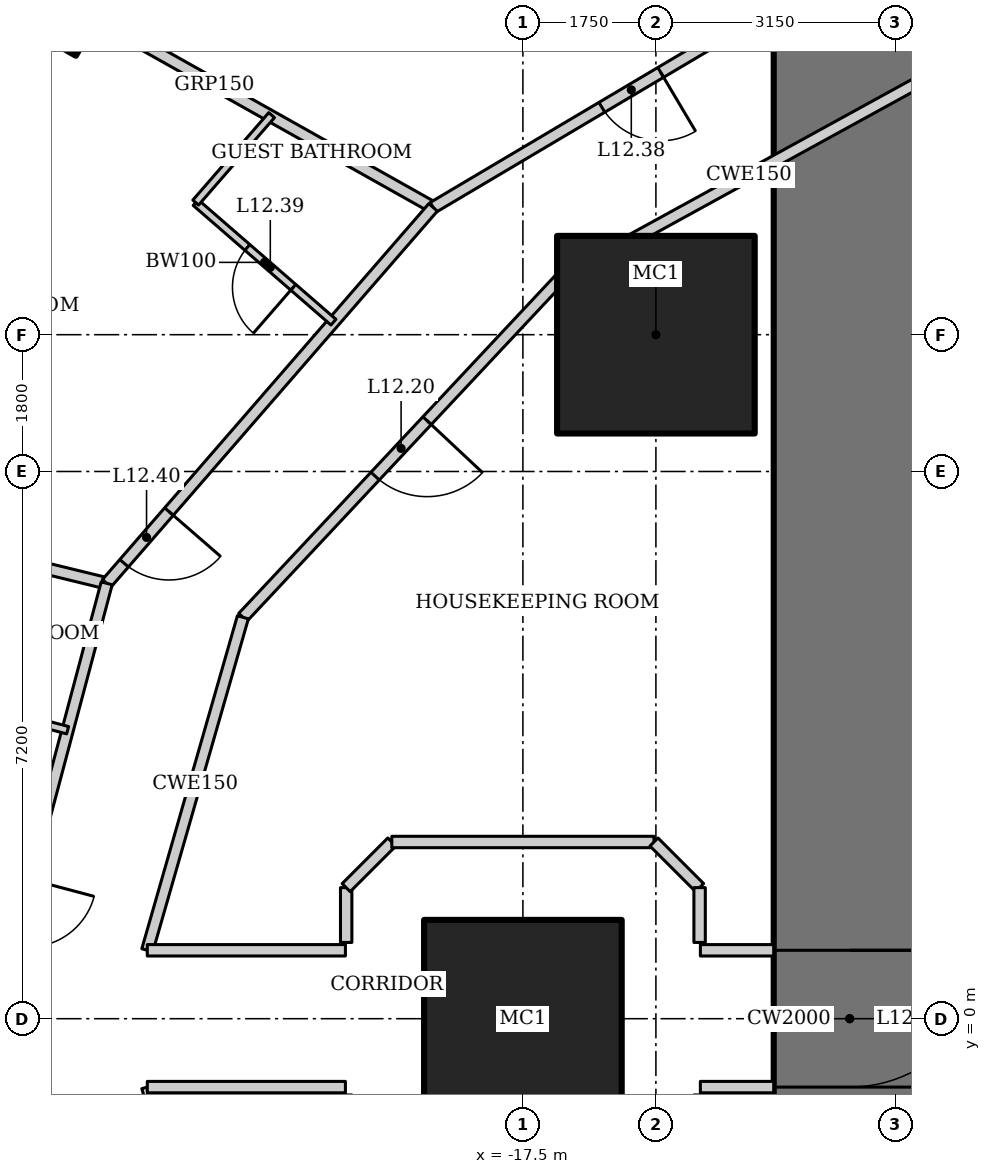
"""IFC4 building model, lengths in metres.
Left out: names, types, materials, properties, quantities, classifications, styles, units other than length and angle.
Written with IfcOpenShell. Run it as: python <this file> out.ifc"""

import sys

from ifc_helpers import new_model, si_unit, direction, frame, frame_2d, origin, origin_2d, place, context, subcontext, project, spatial, rectangle, hollow_rectangle, extrude, element, fill, save


model = new_model("IFC4")
c1 = context("Model", 3, precision=1e-05, world=origin(), true_north=direction((0.0, 1.0)))
c2 = subcontext(c1, "Body", "Model", "MODEL_VIEW")
j1 = project(units=[si_unit("LENGTHUNIT", "METRE"), si_unit("PLANEANGLEUNIT", "RADIAN")], contexts=[c1])
p1 = place(None, origin())
s1 = spatial("IfcSite", under=j1, at=p1, CompositionType="ELEMENT")
p2 = place(p1, origin())
s2 = spatial("IfcBuilding", under=s1, at=p2, CompositionType="ELEMENT")
p3 = place(p2, frame((0.0, 0.0, 58.6)))
s3 = spatial("IfcBuildingStorey", under=s2, at=p3, CompositionType="ELEMENT", Elevation=58.6)
for number, where, z_axis, x_axis in (
    (1, (-15.75, 9.0, 0.0), (0.0, 0.0, 1.0), (1.0, 0.0, 0.0)),
    (2, (-17.5, 0.0, 0.0), (0.0, 0.0, 1.0), (1.0, 0.0, 0.0)),
):
    element("IfcColumn", number, at=place(p3, frame(where, z_axis=z_axis, x_axis=x_axis)), inside=s3, PredefinedType="COLUMN", context=c2, shape_type="SweptSolid", body=[
        extrude(hollow_rectangle(XDim=2.6, YDim=2.6, WallThickness=0.13, at=origin_2d()), origin(), (0.0, 0.0, 1.0), 3.6),
    ])
p4 = place(p3, frame((-23.605, 13.489, 0.0), z_axis=(0.0, 0.0, 1.0), x_axis=(0.496139221777, 0.86824298017, 0.0)))
e3 = element("IfcColumn", 3, at=p4, inside=s3, PredefinedType="COLUMN", context=c2, shape_type="SweptSolid", body=[
    extrude(hollow_rectangle(XDim=1.2, YDim=1.2, WallThickness=0.12, at=origin_2d()), origin(), (0.0, 0.0, 1.0), 3.6),
])
p5 = place(p3, frame((-13.2, 13.0, 0.0), z_axis=(0.0, 0.0, 1.0), x_axis=(0.0, -1.0, 0.0)))
e4 = element("IfcWall", 4, at=p5, inside=s3, PredefinedType="SHEAR", context=c2, shape_type="SweptSolid", body=[
    extrude(rectangle(XDim=26.0, YDim=2.0, at=frame_2d((13.0, 0.0))), origin(), (0.0, 0.0, 1.0), 3.6),
])
p6 = place(p5, frame((12.1, 0.0, 0.0)))
e5 = element("IfcOpeningElement", 5, at=p6, cuts=e4, PredefinedType="OPENING", context=c2, shape_type="SweptSolid", body=[
    extrude(rectangle(XDim=1.8, YDim=2.1, at=frame_2d((0.9, 1.05))), frame((0.0, 1.01, 0.0), z_axis=(0.0, -1.0, 0.0), x_axis=(1.0, 0.0, 0.0)), (0.0, 0.0, 1.0), 2.02),
])
p7 = place(p3, frame((-24.435, 13.909, 0.0), z_axis=(0.0, 0.0, 1.0), x_axis=(0.871747379892, -0.489955616001, 0.0)))
e6 = element("IfcWall", 6, at=p7, inside=s3, PredefinedType="PARTITIONING", context=c2, shape_type="SweptSolid", body=[
    extrude(rectangle(XDim=6.6, YDim=0.15, at=frame_2d((3.3, 0.0))), origin(), (0.0, 0.0, 1.0), 2.693),
])
p8 = place(p3, frame((-29.222, 7.254, 0.0), z_axis=(0.0, 0.0, 1.0), x_axis=(0.971456980633, -0.237215797913, 0.0)))
e7 = element("IfcWall", 7, at=p8, inside=s3, PredefinedType="PARTITIONING", context=c2, shape_type="SweptSolid", body=[
    extrude(rectangle(XDim=6.429, YDim=0.15, at=frame_2d((3.215, 0.0))), origin(), (0.0, 0.0, 1.0), 2.332),
])
p9 = place(p3, frame((-13.357, 13.832, 0.0), z_axis=(0.0, 0.0, 1.0), x_axis=(-0.860147339762, -0.510045639036, 0.0)))
e8 = element("IfcWall", 8, at=p9, inside=s3, PredefinedType="PARTITIONING", context=c2, shape_type="SweptSolid", body=[
    extrude(rectangle(XDim=6.19, YDim=0.15, at=frame_2d((3.095, 0.0))), origin(), (0.0, 0.0, 1.0), 3.45),
])
p10 = place(p9, frame((2.708, 0.0, 0.0)))
e9 = element("IfcOpeningElement", 9, at=p10, cuts=e8, PredefinedType="OPENING", context=c2, shape_type="SweptSolid", body=[
    extrude(rectangle(XDim=0.9, YDim=2.1, at=frame_2d((0.45, 1.05))), frame((0.0, 0.085, 0.0), z_axis=(0.0, -1.0, 0.0), x_axis=(1.0, 0.0, 0.0)), (0.0, 0.0, 1.0), 0.17),
])
p11 = place(p3, frame((-18.681, 10.675, 0.0), z_axis=(0.0, 0.0, 1.0), x_axis=(-0.655599989166, -0.755108372491, 0.0)))
e10 = element("IfcWall", 10, at=p11, inside=s3, PredefinedType="PARTITIONING", context=c2, shape_type="SweptSolid", body=[
    extrude(rectangle(XDim=6.551, YDim=0.15, at=frame_2d((3.275, 0.0))), origin(), (0.0, 0.0, 1.0), 3.45),
])
p12 = place(p11, frame((5.301, 0.0, 0.0)))
e11 = element("IfcOpeningElement", 11, at=p12, cuts=e10, PredefinedType="OPENING", context=c2, shape_type="SweptSolid", body=[
    extrude(rectangle(XDim=0.9, YDim=2.1, at=frame_2d((0.45, 1.05))), frame((0.0, 0.085, 0.0), z_axis=(0.0, -1.0, 0.0), x_axis=(1.0, 0.0, 0.0)), (0.0, 0.0, 1.0), 0.17),
])
p13 = place(p3, frame((-22.976, 5.729, 0.0), z_axis=(0.0, 0.0, 1.0), x_axis=(-0.257083265334, -0.966389256296, 0.0)))
e12 = element("IfcWall", 12, at=p13, inside=s3, PredefinedType="PARTITIONING", context=c2, shape_type="SweptSolid", body=[
    extrude(rectangle(XDim=5.928, YDim=0.15, at=frame_2d((2.964, 0.0))), origin(), (0.0, 0.0, 1.0), 3.45),
])
p14 = place(p13, frame((4.023, 0.0, 0.0)))
e13 = element("IfcOpeningElement", 13, at=p14, cuts=e12, PredefinedType="OPENING", context=c2, shape_type="SweptSolid", body=[
    extrude(rectangle(XDim=0.9, YDim=2.1, at=frame_2d((0.45, 1.05))), frame((0.0, 0.085, 0.0), z_axis=(0.0, -1.0, 0.0), x_axis=(1.0, 0.0, 0.0)), (0.0, 0.0, 1.0), 0.17),
])
p15 = place(p3, frame((-24.5, 0.0, 0.0), z_axis=(0.0, 0.0, 1.0), x_axis=(0.257083265334, -0.966389256296, 0.0)))
e14 = element("IfcWall", 14, at=p15, inside=s3, PredefinedType="PARTITIONING", context=c2, shape_type="SweptSolid", body=[
    extrude(rectangle(XDim=5.928, YDim=0.15, at=frame_2d((2.964, 0.0))), origin(), (0.0, 0.0, 1.0), 3.45),
])
p16 = place(p15, frame((2.1, 0.0, 0.0)))
e15 = element("IfcOpeningElement", 15, at=p16, cuts=e14, PredefinedType="OPENING", context=c2, shape_type="SweptSolid", body=[
    extrude(rectangle(XDim=0.9, YDim=2.1, at=frame_2d((0.45, 1.05))), frame((0.0, 0.085, 0.0), z_axis=(0.0, -1.0, 0.0), x_axis=(1.0, 0.0, 0.0)), (0.0, 0.0, 1.0), 0.17),
])
p17 = place(p3, frame((-12.036, 12.464, 0.0), z_axis=(0.0, 0.0, 1.0), x_axis=(-0.876522084062, -0.481361647986, 0.0)))
e16 = element("IfcWall", 16, at=p17, inside=s3, PredefinedType="PARTITIONING", context=c2, shape_type="SweptSolid", body=[
    extrude(rectangle(XDim=5.687, YDim=0.15, at=frame_2d((2.844, 0.0))), origin(), (0.0, 0.0, 1.0), 3.45),
])
p18 = place(p3, frame((-17.021, 9.726, 0.0), z_axis=(0.0, 0.0, 1.0), x_axis=(-0.68365836236, -0.729802194828, 0.0)))
e17 = element("IfcWall", 17, at=p18, inside=s3, PredefinedType="PARTITIONING", context=c2, shape_type="SweptSolid", body=[
    extrude(rectangle(XDim=6.09, YDim=0.15, at=frame_2d((3.045, 0.0))), origin(), (0.0, 0.0, 1.0), 3.45),
])
p19 = place(p18, frame((2.545, 0.0, 0.0)))
e18 = element("IfcOpeningElement", 18, at=p19, cuts=e17, PredefinedType="OPENING", context=c2, shape_type="SweptSolid", body=[
    extrude(rectangle(XDim=1.0, YDim=2.1, at=frame_2d((0.5, 1.05))), frame((0.0, 0.085, 0.0), z_axis=(0.0, -1.0, 0.0), x_axis=(1.0, 0.0, 0.0)), (0.0, 0.0, 1.0), 0.17),
])
for number, where, z_axis, x_axis in (
    (19, (-21.184, 5.282, 0.0), (0.0, 0.0, 1.0), (-0.276, -0.961, 0.0)),
    (20, (-22.442, -0.9, 0.0), (0.0, 0.0, 1.0), (0.276, -0.961, 0.0)),
):
    element("IfcWall", number, at=place(p3, frame(where, z_axis=z_axis, x_axis=x_axis)), inside=s3, PredefinedType="PARTITIONING", context=c2, shape_type="SweptSolid", body=[
        extrude(rectangle(XDim=4.559, YDim=0.15, at=frame_2d((2.279, 0.0))), origin(), (0.0, 0.0, 1.0), 3.45),
    ])
p20 = place(p3, frame((-19.993, 9.165, 0.0), z_axis=(0.0, 0.0, 1.0), x_axis=(-0.755098052661, 0.655611875172, 0.0)))
e21 = element("IfcWall", 21, at=p20, inside=s3, PredefinedType="PARTITIONING", context=c2, shape_type="SweptSolid", body=[
    extrude(rectangle(XDim=2.4, YDim=0.1, at=frame_2d((1.2, 0.0))), origin(), (0.0, 0.0, 1.0), 3.45),
])
p21 = place(p20, frame((0.7, 0.0, 0.0)))
e22 = element("IfcOpeningElement", 22, at=p21, cuts=e21, PredefinedType="OPENING", context=c2, shape_type="SweptSolid", body=[
    extrude(rectangle(XDim=0.8, YDim=2.1, at=frame_2d((0.4, 1.05))), frame((0.0, 0.06, 0.0), z_axis=(0.0, -1.0, 0.0), x_axis=(1.0, 0.0, 0.0)), (0.0, 0.0, 1.0), 0.12),
])
p22 = place(p3, frame((-21.805, 10.738, 0.0), z_axis=(0.0, 0.0, 1.0), x_axis=(0.655528024617, 0.755170847518, 0.0)))
e23 = element("IfcWall", 23, at=p22, inside=s3, PredefinedType="PARTITIONING", context=c2, shape_type="SweptSolid", body=[
    extrude(rectangle(XDim=1.524, YDim=0.1, at=frame_2d((0.762, 0.0))), origin(), (0.0, 0.0, 1.0), 3.45),
])
p23 = place(p3, frame((-23.49, 3.796, 0.0), z_axis=(0.0, 0.0, 1.0), x_axis=(-0.96639514992, 0.257061109879, 0.0)))
e24 = element("IfcWall", 24, at=p23, inside=s3, PredefinedType="PARTITIONING", context=c2, shape_type="SweptSolid", body=[
    extrude(rectangle(XDim=2.4, YDim=0.1, at=frame_2d((1.2, 0.0))), origin(), (0.0, 0.0, 1.0), 3.45),
])
p24 = place(p23, frame((0.7, 0.0, 0.0)))
e25 = element("IfcOpeningElement", 25, at=p24, cuts=e24, PredefinedType="OPENING", context=c2, shape_type="SweptSolid", body=[
    extrude(rectangle(XDim=0.8, YDim=2.1, at=frame_2d((0.4, 1.05))), frame((0.0, 0.06, 0.0), z_axis=(0.0, -1.0, 0.0), x_axis=(1.0, 0.0, 0.0)), (0.0, 0.0, 1.0), 0.12),
])
p25 = place(p3, frame((-14.2, -0.9, 0.0), z_axis=(0.0, 0.0, 1.0), x_axis=(-1.0, 0.0, 0.0)))
e26 = element("IfcWall", 26, at=p25, inside=s3, PredefinedType="PARTITIONING", context=c2, shape_type="SweptSolid", body=[
    extrude(rectangle(XDim=0.965, YDim=0.15, at=frame_2d((0.482, 0.0))), origin(), (0.0, 0.0, 1.0), 3.45),
])
p26 = place(p3, frame((-19.835, -0.9, 0.0), z_axis=(0.0, 0.0, 1.0), x_axis=(-1.0, 0.0, 0.0)))
e27 = element("IfcWall", 27, at=p26, inside=s3, PredefinedType="PARTITIONING", context=c2, shape_type="SweptSolid", body=[
    extrude(rectangle(XDim=2.607, YDim=0.15, at=frame_2d((1.303, 0.0))), origin(), (0.0, 0.0, 1.0), 3.45),
])
p27 = place(p3, frame((-14.2, 0.9, 0.0), z_axis=(0.0, 0.0, 1.0), x_axis=(-1.0, 0.0, 0.0)))
e28 = element("IfcWall", 28, at=p27, inside=s3, PredefinedType="PARTITIONING", context=c2, shape_type="SweptSolid", body=[
    extrude(rectangle(XDim=0.965, YDim=0.15, at=frame_2d((0.482, 0.0))), origin(), (0.0, 0.0, 1.0), 3.45),
])
p28 = place(p3, frame((-19.835, 0.9, 0.0), z_axis=(0.0, 0.0, 1.0), x_axis=(-1.0, 0.0, 0.0)))
e29 = element("IfcWall", 29, at=p28, inside=s3, PredefinedType="PARTITIONING", context=c2, shape_type="SweptSolid", body=[
    extrude(rectangle(XDim=2.607, YDim=0.15, at=frame_2d((1.303, 0.0))), origin(), (0.0, 0.0, 1.0), 3.45),
])
p29 = place(p3, frame((-19.825, 1.003, 0.0), z_axis=(0.0, 0.0, 1.0), x_axis=(0.0, 1.0, 0.0)))
e30 = element("IfcWall", 30, at=p29, inside=s3, PredefinedType="PARTITIONING", context=c2, shape_type="SweptSolid", body=[
    extrude(rectangle(XDim=0.721, YDim=0.15, at=frame_2d((0.361, 0.0))), origin(), (0.0, 0.0, 1.0), 3.45),
])
p30 = place(p3, frame((-19.825, 1.725, 0.0), z_axis=(0.0, 0.0, 1.0), x_axis=(0.707106781187, 0.707106781187, 0.0)))
e31 = element("IfcWall", 31, at=p30, inside=s3, PredefinedType="PARTITIONING", context=c2, shape_type="SweptSolid", body=[
    extrude(rectangle(XDim=0.849, YDim=0.15, at=frame_2d((0.425, 0.0))), origin(), (0.0, 0.0, 1.0), 3.45),
])
p31 = place(p3, frame((-19.225, 2.325, 0.0), z_axis=(0.0, 0.0, 1.0), x_axis=(1.0, 0.0, 0.0)))
e32 = element("IfcWall", 32, at=p31, inside=s3, PredefinedType="PARTITIONING", context=c2, shape_type="SweptSolid", body=[
    extrude(rectangle(XDim=3.449, YDim=0.15, at=frame_2d((1.725, 0.0))), origin(), (0.0, 0.0, 1.0), 3.45),
])
p32 = place(p3, frame((-15.775, 2.325, 0.0), z_axis=(0.0, 0.0, 1.0), x_axis=(0.707106781187, -0.707106781187, 0.0)))
e33 = element("IfcWall", 33, at=p32, inside=s3, PredefinedType="PARTITIONING", context=c2, shape_type="SweptSolid", body=[
    extrude(rectangle(XDim=0.849, YDim=0.15, at=frame_2d((0.425, 0.0))), origin(), (0.0, 0.0, 1.0), 3.45),
])
p33 = place(p3, frame((-15.175, 1.725, 0.0), z_axis=(0.0, 0.0, 1.0), x_axis=(0.0, -1.0, 0.0)))
e34 = element("IfcWall", 34, at=p33, inside=s3, PredefinedType="PARTITIONING", context=c2, shape_type="SweptSolid", body=[
    extrude(rectangle(XDim=0.721, YDim=0.15, at=frame_2d((0.361, 0.0))), origin(), (0.0, 0.0, 1.0), 3.45),
])
p34 = place(p6, origin())
e35 = element("IfcDoor", 35, at=p34, inside=s3, OperationType="DOUBLE_DOOR_DOUBLE_SWING", PredefinedType="DOOR", context=c2, shape_type="SweptSolid", body=[
    extrude(rectangle(XDim=1.8, YDim=2.1, at=frame_2d((0.9, 1.05))), frame((0.0, 0.025, 0.0), z_axis=(0.0, -1.0, 0.0), x_axis=(1.0, 0.0, 0.0)), (0.0, 0.0, 1.0), 0.05),
])
fill(e5, e35)
p35 = place(p19, origin())
e36 = element("IfcDoor", 36, at=p35, inside=s3, OperationType="SINGLE_SWING_LEFT", PredefinedType="DOOR", context=c2, shape_type="SweptSolid", body=[
    extrude(rectangle(XDim=1.0, YDim=2.1, at=frame_2d((0.5, 1.05))), frame((0.0, 0.025, 0.0), z_axis=(0.0, -1.0, 0.0), x_axis=(1.0, 0.0, 0.0)), (0.0, 0.0, 1.0), 0.05),
])
fill(e18, e36)
p36 = place(p10, origin())
e37 = element("IfcDoor", 37, at=p36, inside=s3, OperationType="SINGLE_SWING_LEFT", PredefinedType="DOOR", context=c2, shape_type="SweptSolid", body=[
    extrude(rectangle(XDim=0.9, YDim=2.1, at=frame_2d((0.45, 1.05))), frame((0.0, 0.025, 0.0), z_axis=(0.0, -1.0, 0.0), x_axis=(1.0, 0.0, 0.0)), (0.0, 0.0, 1.0), 0.05),
])
fill(e9, e37)
p37 = place(p21, origin())
e38 = element("IfcDoor", 38, at=p37, inside=s3, OperationType="SINGLE_SWING_LEFT", PredefinedType="DOOR", context=c2, shape_type="SweptSolid", body=[
    extrude(rectangle(XDim=0.8, YDim=2.1, at=frame_2d((0.4, 1.05))), frame((0.0, 0.025, 0.0), z_axis=(0.0, -1.0, 0.0), x_axis=(1.0, 0.0, 0.0)), (0.0, 0.0, 1.0), 0.05),
])
fill(e22, e38)
p38 = place(p12, origin())
e39 = element("IfcDoor", 39, at=p38, inside=s3, OperationType="SINGLE_SWING_LEFT", PredefinedType="DOOR", context=c2, shape_type="SweptSolid", body=[
    extrude(rectangle(XDim=0.9, YDim=2.1, at=frame_2d((0.45, 1.05))), frame((0.0, 0.025, 0.0), z_axis=(0.0, -1.0, 0.0), x_axis=(1.0, 0.0, 0.0)), (0.0, 0.0, 1.0), 0.05),
])
fill(e11, e39)
save(model, sys.argv[1])
